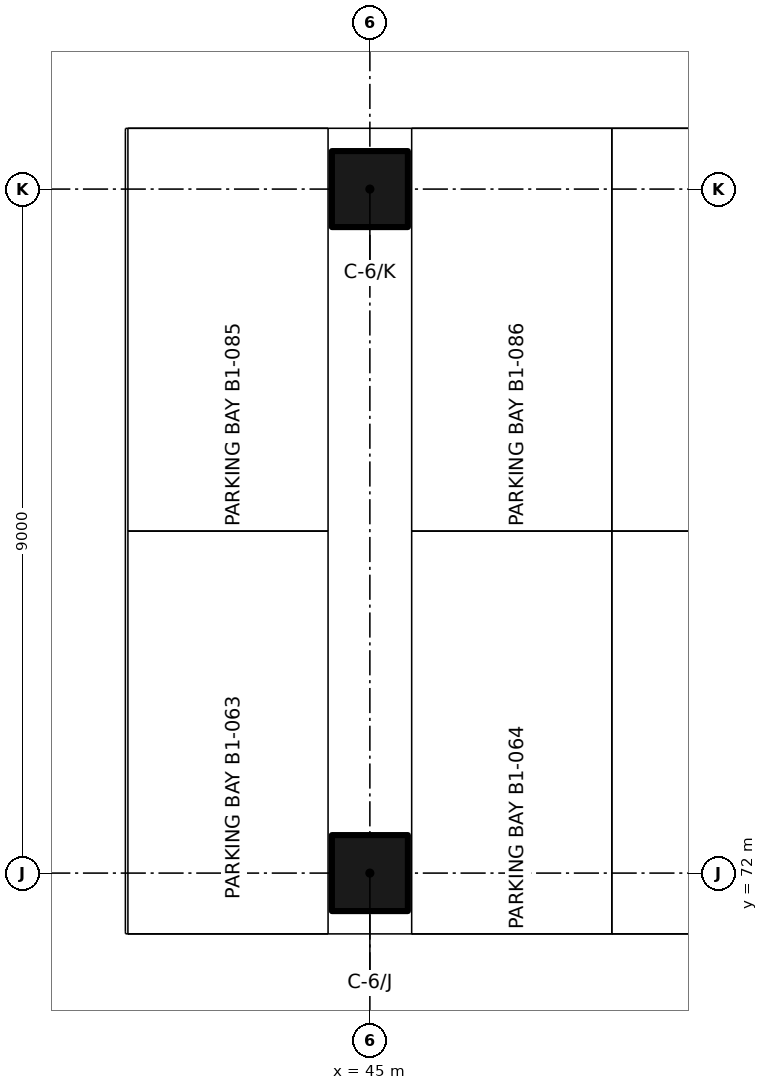
"""IFC4 building model, lengths in metres.
Left out: names, types, materials, properties, quantities, classifications, styles, units other than length and angle.
Written with IfcOpenShell. Run it as: python <this file> out.ifc"""

import sys

from ifc_helpers import new_model, si_unit, direction, frame, origin, origin_2d, place, context, subcontext, project, spatial, rectangle, extrude, element, save


model = new_model("IFC4")
c1 = context("Model", 3, precision=1e-05, world=origin(), true_north=direction((0.0, 1.0)))
c2 = subcontext(c1, "Body", "Model", "MODEL_VIEW")
j1 = project(units=[si_unit("LENGTHUNIT", "METRE"), si_unit("PLANEANGLEUNIT", "RADIAN")], contexts=[c1])
p1 = place(None, origin())
s1 = spatial("IfcSite", under=j1, at=p1, CompositionType="ELEMENT")
p2 = place(p1, origin())
s2 = spatial("IfcBuilding", under=s1, at=p2, CompositionType="ELEMENT")
p3 = place(p2, frame((0.0, 0.0, -5.1)))
s3 = spatial("IfcBuildingStorey", under=s2, at=p3, CompositionType="ELEMENT", Elevation=-5.1)
for number, where, z_axis, x_axis in (
    (1, (45.0, 72.0, 0.0), (0.0, 0.0, 1.0), (1.0, 0.0, 0.0)),
    (2, (45.0, 81.0, 0.0), (0.0, 0.0, 1.0), (1.0, 0.0, 0.0)),
):
    element("IfcColumn", number, at=place(p3, frame(where, z_axis=z_axis, x_axis=x_axis)), inside=s3, PredefinedType="COLUMN", context=c2, shape_type="SweptSolid", body=[
        extrude(rectangle(XDim=1.0, YDim=1.0, at=origin_2d()), origin(), (0.0, 0.0, 1.0), 5.1),
    ])
save(model, sys.argv[1])
